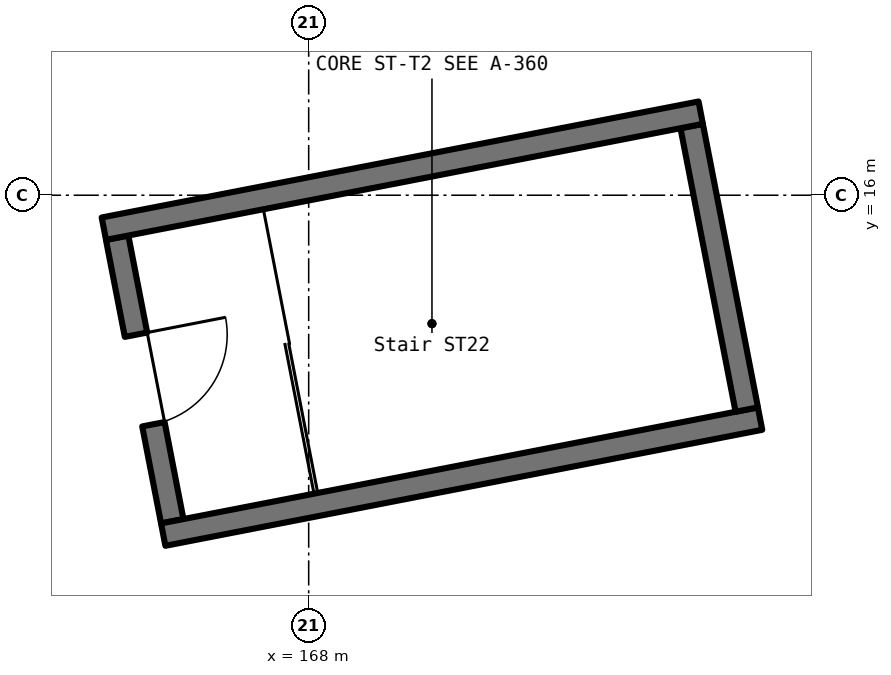
"""IFC4 building model, lengths in metres.
Left out: names, types, materials, properties, quantities, classifications, styles, units other than length and angle.
Written with IfcOpenShell. Run it as: python <this file> out.ifc"""

import sys

from ifc_helpers import new_model, si_unit, direction, frame, frame_2d, origin, place, context, subcontext, project, spatial, rectangle, extrude, element, fill, save


model = new_model("IFC4")
c1 = context("Model", 3, precision=1e-05, world=origin(), true_north=direction((0.0, 1.0)))
c2 = subcontext(c1, "Body", "Model", "MODEL_VIEW")
j1 = project(units=[si_unit("LENGTHUNIT", "METRE"), si_unit("PLANEANGLEUNIT", "RADIAN")], contexts=[c1])
p1 = place(None, origin())
s1 = spatial("IfcSite", under=j1, at=p1, CompositionType="ELEMENT")
p2 = place(p1, origin())
s2 = spatial("IfcBuilding", under=s1, at=p2, CompositionType="ELEMENT")
p3 = place(p2, frame((0.0, 0.0, 17.0)))
s3 = spatial("IfcBuildingStorey", under=s2, at=p3, CompositionType="ELEMENT", Elevation=17.0)
p4 = place(p3, frame((163.01, 9.569, 0.0), z_axis=(0.0, 0.0, 1.0), x_axis=(0.990271171238, 0.139151023763, 0.0)))
e1 = element("IfcWall", 1, at=p4, inside=s3, PredefinedType="PARAPET", context=c2, shape_type="SweptSolid", body=[
    extrude(rectangle(XDim=7.423, YDim=0.3, at=frame_2d((3.712, 0.0))), origin(), (0.0, 0.0, 1.0), 1.1),
])
p5 = place(p3, frame((170.361, 10.602, 0.0), z_axis=(0.0, 0.0, 1.0), x_axis=(0.990267986364, 0.139173687105, 0.0)))
e2 = element("IfcWall", 2, at=p5, inside=s3, PredefinedType="PARAPET", context=c2, shape_type="SweptSolid", body=[
    extrude(rectangle(XDim=7.422, YDim=0.3, at=frame_2d((3.711, 0.0))), origin(), (0.0, 0.0, 1.0), 1.1),
])
p6 = place(p3, frame((165.48, 15.441, 0.0), z_axis=(0.0, 0.0, 1.0), x_axis=(0.190824946063, -0.981624082814, 0.0)))
e3 = element("IfcWall", 3, at=p6, inside=s3, PredefinedType="SOLIDWALL", context=c2, shape_type="SweptSolid", body=[
    extrude(rectangle(XDim=3.8, YDim=0.3, at=frame_2d((1.9, 0.0))), origin(), (0.0, 0.0, 1.0), 4.2),
])
p7 = place(p6, frame((1.3, 0.0, 0.0)))
e4 = element("IfcOpeningElement", 4, at=p7, cuts=e3, PredefinedType="OPENING", context=c2, shape_type="SweptSolid", body=[
    extrude(rectangle(XDim=1.2, YDim=2.1, at=frame_2d((0.6, 1.05))), frame((0.0, 0.162, 0.0), z_axis=(0.0, -1.0, 0.0), x_axis=(1.0, 0.0, 0.0)), (0.0, 0.0, 1.0), 0.324),
])
p8 = place(p3, frame((166.086, 11.535, 0.0), z_axis=(0.0, 0.0, 1.0), x_axis=(0.981635396686, 0.190766737073, 0.0)))
e5 = element("IfcWall", 5, at=p8, inside=s3, PredefinedType="SOLIDWALL", context=c2, shape_type="SweptSolid", body=[
    extrude(rectangle(XDim=8.0, YDim=0.3, at=frame_2d((4.0, 0.0))), origin(), (0.0, 0.0, 1.0), 4.2),
])
p9 = place(p3, frame((173.764, 13.18, 0.0), z_axis=(0.0, 0.0, 1.0), x_axis=(-0.190763033741, 0.981636116368, 0.0)))
e6 = element("IfcWall", 6, at=p9, inside=s3, PredefinedType="SOLIDWALL", context=c2, shape_type="SweptSolid", body=[
    extrude(rectangle(XDim=3.8, YDim=0.3, at=frame_2d((1.9, 0.0))), origin(), (0.0, 0.0, 1.0), 4.2),
])
p10 = place(p3, frame((173.158, 17.086, 0.0), z_axis=(0.0, 0.0, 1.0), x_axis=(-0.981641111144, -0.190737329623, 0.0)))
e7 = element("IfcWall", 7, at=p10, inside=s3, PredefinedType="SOLIDWALL", context=c2, shape_type="SweptSolid", body=[
    extrude(rectangle(XDim=8.0, YDim=0.3, at=frame_2d((4.0, 0.0))), origin(), (0.0, 0.0, 1.0), 4.2),
])
p11 = place(p7, origin())
e8 = element("IfcDoor", 8, at=p11, inside=s3, OperationType="SINGLE_SWING_LEFT", PredefinedType="DOOR", context=c2, shape_type="SweptSolid", body=[
    extrude(rectangle(XDim=1.2, YDim=2.1, at=frame_2d((0.6, 1.05))), frame((0.0, 0.025, 0.0), z_axis=(0.0, -1.0, 0.0), x_axis=(1.0, 0.0, 0.0)), (0.0, 0.0, 1.0), 0.05),
])
fill(e4, e8)
save(model, sys.argv[1])
